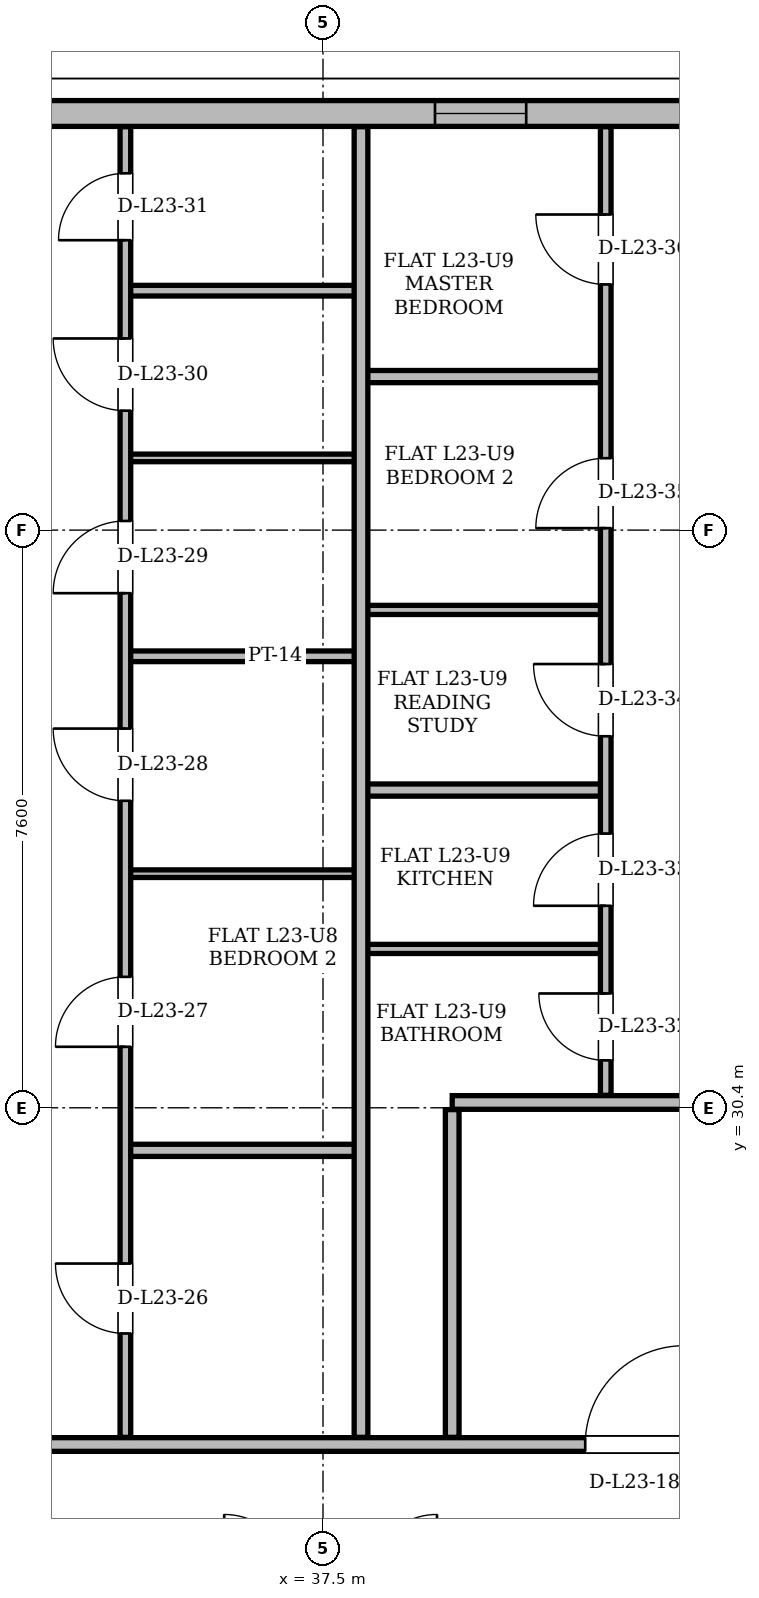
"""IFC4 building model, lengths in metres.
Left out: names, types, materials, properties, quantities, classifications, styles, units other than length and angle.
Written with IfcOpenShell. Run it as: python <this file> out.ifc"""

import sys

from ifc_helpers import new_model, si_unit, direction, frame, frame_2d, origin, place, context, subcontext, project, spatial, rectangle, extrude, element, fill, save


model = new_model("IFC4")
c1 = context("Model", 3, precision=1e-05, world=origin(), true_north=direction((0.0, 1.0)))
c2 = subcontext(c1, "Body", "Model", "MODEL_VIEW")
j1 = project(units=[si_unit("LENGTHUNIT", "METRE"), si_unit("PLANEANGLEUNIT", "RADIAN")], contexts=[c1])
p1 = place(None, origin())
s1 = spatial("IfcSite", under=j1, at=p1, CompositionType="ELEMENT")
p2 = place(p1, origin())
s2 = spatial("IfcBuilding", under=s1, at=p2, CompositionType="ELEMENT")
p3 = place(p2, frame((0.0, 0.0, 89.7)))
s3 = spatial("IfcBuildingStorey", under=s2, at=p3, CompositionType="ELEMENT", Elevation=89.7)
p4 = place(p3, frame((43.722, 43.481, 0.0), z_axis=(0.0, 0.0, 1.0), x_axis=(-1.0, 0.0, 0.0)))
e1 = element("IfcWall", 1, at=p4, inside=s3, PredefinedType="SOLIDWALL", context=c2, shape_type="SweptSolid", body=[
    extrude(rectangle(XDim=12.445, YDim=0.34, at=frame_2d((6.222, 0.0))), origin(), (0.0, 0.0, 1.0), 2.578),
])
p5 = place(p4, frame((3.549, 0.0, 0.85)))
e2 = element("IfcOpeningElement", 2, at=p5, cuts=e1, PredefinedType="OPENING", context=c2, shape_type="SweptSolid", body=[
    extrude(rectangle(XDim=1.2, YDim=1.48, at=frame_2d((0.6, 0.74))), frame((0.0, 0.17, 0.0), z_axis=(0.0, -1.0, 0.0), x_axis=(1.0, 0.0, 0.0)), (0.0, 0.0, 1.0), 0.34),
])
p6 = place(p3, frame((27.55, 25.97, 0.0), z_axis=(0.0, 0.0, 1.0), x_axis=(1.0, 0.0, 0.0)))
e3 = element("IfcWall", 3, at=p6, inside=s3, PredefinedType="PARTITIONING", context=c2, shape_type="SweptSolid", body=[
    extrude(rectangle(XDim=19.9, YDim=0.18, at=frame_2d((9.95, 0.0))), origin(), (0.0, 0.0, 1.0), 2.814),
])
p7 = place(p6, frame((0.425, 0.0, 0.0)))
e4 = element("IfcOpeningElement", 4, at=p7, cuts=e3, PredefinedType="OPENING", context=c2, shape_type="SweptSolid", body=[
    extrude(rectangle(XDim=1.0, YDim=2.18, at=frame_2d((0.5, 1.09))), frame((0.0, 0.09, 0.0), z_axis=(0.0, -1.0, 0.0), x_axis=(1.0, 0.0, 0.0)), (0.0, 0.0, 1.0), 0.18),
])
p8 = place(p6, frame((4.222, 0.0, 0.0)))
e5 = element("IfcOpeningElement", 5, at=p8, cuts=e3, PredefinedType="OPENING", context=c2, shape_type="SweptSolid", body=[
    extrude(rectangle(XDim=1.0, YDim=2.18, at=frame_2d((0.5, 1.09))), frame((0.0, 0.09, 0.0), z_axis=(0.0, -1.0, 0.0), x_axis=(1.0, 0.0, 0.0)), (0.0, 0.0, 1.0), 0.18),
])
p9 = place(p6, frame((13.4, 0.0, 0.0)))
e6 = element("IfcOpeningElement", 6, at=p9, cuts=e3, PredefinedType="OPENING", context=c2, shape_type="SweptSolid", body=[
    extrude(rectangle(XDim=1.3, YDim=2.2, at=frame_2d((0.65, 1.1))), frame((0.0, 0.09, 0.0), z_axis=(0.0, -1.0, 0.0), x_axis=(1.0, 0.0, 0.0)), (0.0, 0.0, 1.0), 0.18),
])
p10 = place(p6, frame((16.95, 0.0, 0.0)))
e7 = element("IfcOpeningElement", 7, at=p10, cuts=e3, PredefinedType="OPENING", context=c2, shape_type="SweptSolid", body=[
    extrude(rectangle(XDim=1.0, YDim=2.18, at=frame_2d((0.5, 1.09))), frame((0.0, 0.09, 0.0), z_axis=(0.0, -1.0, 0.0), x_axis=(1.0, 0.0, 0.0)), (0.0, 0.0, 1.0), 0.18),
])
p11 = place(p3, frame((34.9, 29.84, 0.0), z_axis=(0.0, 0.0, 1.0), x_axis=(1.0, 0.0, 0.0)))
e8 = element("IfcWall", 8, at=p11, inside=s3, PredefinedType="PARTITIONING", context=c2, shape_type="SweptSolid", body=[
    extrude(rectangle(XDim=3.15, YDim=0.16, at=frame_2d((1.575, 0.0))), origin(), (0.0, 0.0, 1.0), 3.36),
])
p12 = place(p3, frame((39.2, 30.47, 0.0), z_axis=(0.0, 0.0, 1.0), x_axis=(1.0, 0.0, 0.0)))
e9 = element("IfcWall", 9, at=p12, inside=s3, PredefinedType="PARTITIONING", context=c2, shape_type="SweptSolid", body=[
    extrude(rectangle(XDim=4.8, YDim=0.18, at=frame_2d((2.4, 0.0))), origin(), (0.0, 0.0, 1.0), 3.36),
])
p13 = place(p3, frame((37.95, 32.49, 0.0), z_axis=(0.0, 0.0, 1.0), x_axis=(1.0, 0.0, 0.0)))
e10 = element("IfcWall", 10, at=p13, inside=s3, PredefinedType="PARTITIONING", context=c2, shape_type="SweptSolid", body=[
    extrude(rectangle(XDim=3.27, YDim=0.12, at=frame_2d((1.635, 0.0))), origin(), (0.0, 0.0, 1.0), 3.36),
])
p14 = place(p3, frame((34.9, 33.48, 0.0), z_axis=(0.0, 0.0, 1.0), x_axis=(1.0, 0.0, 0.0)))
e11 = element("IfcWall", 11, at=p14, inside=s3, PredefinedType="PARTITIONING", context=c2, shape_type="SweptSolid", body=[
    extrude(rectangle(XDim=3.15, YDim=0.1, at=frame_2d((1.575, 0.0))), origin(), (0.0, 0.0, 1.0), 3.36),
])
p15 = place(p3, frame((37.95, 34.58, 0.0), z_axis=(0.0, 0.0, 1.0), x_axis=(1.0, 0.0, 0.0)))
e12 = element("IfcWall", 12, at=p15, inside=s3, PredefinedType="PARTITIONING", context=c2, shape_type="SweptSolid", body=[
    extrude(rectangle(XDim=3.27, YDim=0.16, at=frame_2d((1.635, 0.0))), origin(), (0.0, 0.0, 1.0), 3.36),
])
p16 = place(p3, frame((34.9, 36.34, 0.0), z_axis=(0.0, 0.0, 1.0), x_axis=(1.0, 0.0, 0.0)))
e13 = element("IfcWall", 13, at=p16, inside=s3, PredefinedType="PARTITIONING", context=c2, shape_type="SweptSolid", body=[
    extrude(rectangle(XDim=3.15, YDim=0.14, at=frame_2d((1.575, 0.0))), origin(), (0.0, 0.0, 1.0), 3.36),
])
p17 = place(p3, frame((37.95, 36.95, 0.0), z_axis=(0.0, 0.0, 1.0), x_axis=(1.0, 0.0, 0.0)))
e14 = element("IfcWall", 14, at=p17, inside=s3, PredefinedType="PARTITIONING", context=c2, shape_type="SweptSolid", body=[
    extrude(rectangle(XDim=3.27, YDim=0.12, at=frame_2d((1.635, 0.0))), origin(), (0.0, 0.0, 1.0), 3.36),
])
p18 = place(p3, frame((34.9, 38.95, 0.0), z_axis=(0.0, 0.0, 1.0), x_axis=(1.0, 0.0, 0.0)))
e15 = element("IfcWall", 15, at=p18, inside=s3, PredefinedType="PARTITIONING", context=c2, shape_type="SweptSolid", body=[
    extrude(rectangle(XDim=3.15, YDim=0.1, at=frame_2d((1.575, 0.0))), origin(), (0.0, 0.0, 1.0), 3.36),
])
p19 = place(p3, frame((37.95, 40.02, 0.0), z_axis=(0.0, 0.0, 1.0), x_axis=(1.0, 0.0, 0.0)))
e16 = element("IfcWall", 16, at=p19, inside=s3, PredefinedType="PARTITIONING", context=c2, shape_type="SweptSolid", body=[
    extrude(rectangle(XDim=3.27, YDim=0.16, at=frame_2d((1.635, 0.0))), origin(), (0.0, 0.0, 1.0), 3.36),
])
p20 = place(p3, frame((34.9, 41.15, 0.0), z_axis=(0.0, 0.0, 1.0), x_axis=(1.0, 0.0, 0.0)))
e17 = element("IfcWall", 17, at=p20, inside=s3, PredefinedType="PARTITIONING", context=c2, shape_type="SweptSolid", body=[
    extrude(rectangle(XDim=3.15, YDim=0.14, at=frame_2d((1.575, 0.0))), origin(), (0.0, 0.0, 1.0), 3.36),
])
p21 = place(p3, frame((34.9, 26.064, 0.0), z_axis=(0.0, 0.0, 1.0), x_axis=(0.0, 1.0, 0.0)))
e18 = element("IfcWall", 18, at=p21, inside=s3, PredefinedType="PARTITIONING", context=c2, shape_type="SweptSolid", body=[
    extrude(rectangle(XDim=17.243, YDim=0.14, at=frame_2d((8.622, 0.0))), origin(), (0.0, 0.0, 1.0), 3.36),
])
p22 = place(p21, frame((1.367, 0.0, 0.0)))
e19 = element("IfcOpeningElement", 19, at=p22, cuts=e18, PredefinedType="OPENING", context=c2, shape_type="SweptSolid", body=[
    extrude(rectangle(XDim=0.92, YDim=2.12, at=frame_2d((0.46, 1.06))), frame((0.0, 0.07, 0.0), z_axis=(0.0, -1.0, 0.0), x_axis=(1.0, 0.0, 0.0)), (0.0, 0.0, 1.0), 0.14),
])
p23 = place(p21, frame((5.138, 0.0, 0.0)))
e20 = element("IfcOpeningElement", 20, at=p23, cuts=e18, PredefinedType="OPENING", context=c2, shape_type="SweptSolid", body=[
    extrude(rectangle(XDim=0.92, YDim=2.12, at=frame_2d((0.46, 1.06))), frame((0.0, 0.07, 0.0), z_axis=(0.0, -1.0, 0.0), x_axis=(1.0, 0.0, 0.0)), (0.0, 0.0, 1.0), 0.14),
])
p24 = place(p21, frame((8.375, 0.0, 0.0)))
e21 = element("IfcOpeningElement", 21, at=p24, cuts=e18, PredefinedType="OPENING", context=c2, shape_type="SweptSolid", body=[
    extrude(rectangle(XDim=0.95, YDim=2.1, at=frame_2d((0.475, 1.05))), frame((0.0, 0.07, 0.0), z_axis=(0.0, -1.0, 0.0), x_axis=(1.0, 0.0, 0.0)), (0.0, 0.0, 1.0), 0.14),
])
p25 = place(p21, frame((11.106, 0.0, 0.0)))
e22 = element("IfcOpeningElement", 22, at=p25, cuts=e18, PredefinedType="OPENING", context=c2, shape_type="SweptSolid", body=[
    extrude(rectangle(XDim=0.95, YDim=2.1, at=frame_2d((0.475, 1.05))), frame((0.0, 0.07, 0.0), z_axis=(0.0, -1.0, 0.0), x_axis=(1.0, 0.0, 0.0)), (0.0, 0.0, 1.0), 0.14),
])
p26 = place(p21, frame((13.507, 0.0, 0.0)))
e23 = element("IfcOpeningElement", 23, at=p26, cuts=e18, PredefinedType="OPENING", context=c2, shape_type="SweptSolid", body=[
    extrude(rectangle(XDim=0.95, YDim=2.1, at=frame_2d((0.475, 1.05))), frame((0.0, 0.07, 0.0), z_axis=(0.0, -1.0, 0.0), x_axis=(1.0, 0.0, 0.0)), (0.0, 0.0, 1.0), 0.14),
])
p27 = place(p21, frame((15.75, 0.0, 0.0)))
e24 = element("IfcOpeningElement", 24, at=p27, cuts=e18, PredefinedType="OPENING", context=c2, shape_type="SweptSolid", body=[
    extrude(rectangle(XDim=0.88, YDim=2.08, at=frame_2d((0.44, 1.04))), frame((0.0, 0.07, 0.0), z_axis=(0.0, -1.0, 0.0), x_axis=(1.0, 0.0, 0.0)), (0.0, 0.0, 1.0), 0.14),
])
p28 = place(p3, frame((38.0, 26.064, 0.0), z_axis=(0.0, 0.0, 1.0), x_axis=(0.0, 1.0, 0.0)))
e25 = element("IfcWall", 25, at=p28, inside=s3, PredefinedType="PARTITIONING", context=c2, shape_type="SweptSolid", body=[
    extrude(rectangle(XDim=17.243, YDim=0.18, at=frame_2d((8.622, 0.0))), origin(), (0.0, 0.0, 1.0), 3.36),
])
p29 = place(p3, frame((39.2, 26.064, 0.0), z_axis=(0.0, 0.0, 1.0), x_axis=(0.0, 1.0, 0.0)))
e26 = element("IfcWall", 26, at=p29, inside=s3, PredefinedType="PARTITIONING", context=c2, shape_type="SweptSolid", body=[
    extrude(rectangle(XDim=4.312, YDim=0.18, at=frame_2d((2.156, 0.0))), origin(), (0.0, 0.0, 1.0), 3.36),
])
p30 = place(p3, frame((41.22, 30.564, 0.0), z_axis=(0.0, 0.0, 1.0), x_axis=(0.0, 1.0, 0.0)))
e27 = element("IfcWall", 27, at=p30, inside=s3, PredefinedType="PARTITIONING", context=c2, shape_type="SweptSolid", body=[
    extrude(rectangle(XDim=12.743, YDim=0.14, at=frame_2d((6.372, 0.0))), origin(), (0.0, 0.0, 1.0), 3.36),
])
p31 = place(p30, frame((0.46, 0.0, 0.0)))
e28 = element("IfcOpeningElement", 28, at=p31, cuts=e27, PredefinedType="OPENING", context=c2, shape_type="SweptSolid", body=[
    extrude(rectangle(XDim=0.88, YDim=2.08, at=frame_2d((0.44, 1.04))), frame((0.0, 0.07, 0.0), z_axis=(0.0, -1.0, 0.0), x_axis=(1.0, 0.0, 0.0)), (0.0, 0.0, 1.0), 0.14),
])
p32 = place(p30, frame((2.494, 0.0, 0.0)))
e29 = element("IfcOpeningElement", 29, at=p32, cuts=e27, PredefinedType="OPENING", context=c2, shape_type="SweptSolid", body=[
    extrude(rectangle(XDim=0.95, YDim=2.1, at=frame_2d((0.475, 1.05))), frame((0.0, 0.07, 0.0), z_axis=(0.0, -1.0, 0.0), x_axis=(1.0, 0.0, 0.0)), (0.0, 0.0, 1.0), 0.14),
])
p33 = place(p30, frame((4.724, 0.0, 0.0)))
e30 = element("IfcOpeningElement", 30, at=p33, cuts=e27, PredefinedType="OPENING", context=c2, shape_type="SweptSolid", body=[
    extrude(rectangle(XDim=0.95, YDim=2.1, at=frame_2d((0.475, 1.05))), frame((0.0, 0.07, 0.0), z_axis=(0.0, -1.0, 0.0), x_axis=(1.0, 0.0, 0.0)), (0.0, 0.0, 1.0), 0.14),
])
p34 = place(p30, frame((7.462, 0.0, 0.0)))
e31 = element("IfcOpeningElement", 31, at=p34, cuts=e27, PredefinedType="OPENING", context=c2, shape_type="SweptSolid", body=[
    extrude(rectangle(XDim=0.92, YDim=2.12, at=frame_2d((0.46, 1.06))), frame((0.0, 0.07, 0.0), z_axis=(0.0, -1.0, 0.0), x_axis=(1.0, 0.0, 0.0)), (0.0, 0.0, 1.0), 0.14),
])
p35 = place(p30, frame((10.668, 0.0, 0.0)))
e32 = element("IfcOpeningElement", 32, at=p35, cuts=e27, PredefinedType="OPENING", context=c2, shape_type="SweptSolid", body=[
    extrude(rectangle(XDim=0.92, YDim=2.12, at=frame_2d((0.46, 1.06))), frame((0.0, 0.07, 0.0), z_axis=(0.0, -1.0, 0.0), x_axis=(1.0, 0.0, 0.0)), (0.0, 0.0, 1.0), 0.14),
])
p36 = place(p5, origin())
e33 = element("IfcWindow", 33, at=p36, inside=s3, PartitioningType="SINGLE_PANEL", PredefinedType="WINDOW", context=c2, shape_type="SweptSolid", body=[
    extrude(rectangle(XDim=1.2, YDim=1.48, at=frame_2d((0.6, 0.74))), frame((0.0, 0.03, 0.0), z_axis=(0.0, -1.0, 0.0), x_axis=(1.0, 0.0, 0.0)), (0.0, 0.0, 1.0), 0.06),
])
fill(e2, e33)
p37 = place(p9, origin())
e34 = element("IfcDoor", 34, at=p37, inside=s3, OperationType="SINGLE_SWING_RIGHT", PredefinedType="DOOR", context=c2, shape_type="SweptSolid", body=[
    extrude(rectangle(XDim=1.3, YDim=2.2, at=frame_2d((0.65, 1.1))), frame((0.0, 0.025, 0.0), z_axis=(0.0, -1.0, 0.0), x_axis=(1.0, 0.0, 0.0)), (0.0, 0.0, 1.0), 0.05),
])
fill(e6, e34)
p38 = place(p22, origin())
e35 = element("IfcDoor", 35, at=p38, inside=s3, OperationType="SINGLE_SWING_RIGHT", PredefinedType="DOOR", context=c2, shape_type="SweptSolid", body=[
    extrude(rectangle(XDim=0.92, YDim=2.12, at=frame_2d((0.46, 1.06))), frame((0.0, 0.025, 0.0), z_axis=(0.0, -1.0, 0.0), x_axis=(1.0, 0.0, 0.0)), (0.0, 0.0, 1.0), 0.05),
])
fill(e19, e35)
p39 = place(p23, origin())
e36 = element("IfcDoor", 36, at=p39, inside=s3, OperationType="SINGLE_SWING_LEFT", PredefinedType="DOOR", context=c2, shape_type="SweptSolid", body=[
    extrude(rectangle(XDim=0.92, YDim=2.12, at=frame_2d((0.46, 1.06))), frame((0.0, 0.025, 0.0), z_axis=(0.0, -1.0, 0.0), x_axis=(1.0, 0.0, 0.0)), (0.0, 0.0, 1.0), 0.05),
])
fill(e20, e36)
p40 = place(p24, origin())
e37 = element("IfcDoor", 37, at=p40, inside=s3, OperationType="SINGLE_SWING_RIGHT", PredefinedType="DOOR", context=c2, shape_type="SweptSolid", body=[
    extrude(rectangle(XDim=0.95, YDim=2.1, at=frame_2d((0.475, 1.05))), frame((0.0, 0.025, 0.0), z_axis=(0.0, -1.0, 0.0), x_axis=(1.0, 0.0, 0.0)), (0.0, 0.0, 1.0), 0.05),
])
fill(e21, e37)
p41 = place(p25, origin())
e38 = element("IfcDoor", 38, at=p41, inside=s3, OperationType="SINGLE_SWING_LEFT", PredefinedType="DOOR", context=c2, shape_type="SweptSolid", body=[
    extrude(rectangle(XDim=0.95, YDim=2.1, at=frame_2d((0.475, 1.05))), frame((0.0, 0.025, 0.0), z_axis=(0.0, -1.0, 0.0), x_axis=(1.0, 0.0, 0.0)), (0.0, 0.0, 1.0), 0.05),
])
fill(e22, e38)
p42 = place(p26, origin())
e39 = element("IfcDoor", 39, at=p42, inside=s3, OperationType="SINGLE_SWING_RIGHT", PredefinedType="DOOR", context=c2, shape_type="SweptSolid", body=[
    extrude(rectangle(XDim=0.95, YDim=2.1, at=frame_2d((0.475, 1.05))), frame((0.0, 0.025, 0.0), z_axis=(0.0, -1.0, 0.0), x_axis=(1.0, 0.0, 0.0)), (0.0, 0.0, 1.0), 0.05),
])
fill(e23, e39)
p43 = place(p27, origin())
e40 = element("IfcDoor", 40, at=p43, inside=s3, OperationType="SINGLE_SWING_LEFT", PredefinedType="DOOR", context=c2, shape_type="SweptSolid", body=[
    extrude(rectangle(XDim=0.88, YDim=2.08, at=frame_2d((0.44, 1.04))), frame((0.0, 0.025, 0.0), z_axis=(0.0, -1.0, 0.0), x_axis=(1.0, 0.0, 0.0)), (0.0, 0.0, 1.0), 0.05),
])
fill(e24, e40)
p44 = place(p31, origin())
e41 = element("IfcDoor", 41, at=p44, inside=s3, OperationType="SINGLE_SWING_RIGHT", PredefinedType="DOOR", context=c2, shape_type="SweptSolid", body=[
    extrude(rectangle(XDim=0.88, YDim=2.08, at=frame_2d((0.44, 1.04))), frame((0.0, 0.025, 0.0), z_axis=(0.0, -1.0, 0.0), x_axis=(1.0, 0.0, 0.0)), (0.0, 0.0, 1.0), 0.05),
])
fill(e28, e41)
p45 = place(p32, origin())
e42 = element("IfcDoor", 42, at=p45, inside=s3, OperationType="SINGLE_SWING_LEFT", PredefinedType="DOOR", context=c2, shape_type="SweptSolid", body=[
    extrude(rectangle(XDim=0.95, YDim=2.1, at=frame_2d((0.475, 1.05))), frame((0.0, 0.025, 0.0), z_axis=(0.0, -1.0, 0.0), x_axis=(1.0, 0.0, 0.0)), (0.0, 0.0, 1.0), 0.05),
])
fill(e29, e42)
p46 = place(p33, origin())
e43 = element("IfcDoor", 43, at=p46, inside=s3, OperationType="SINGLE_SWING_RIGHT", PredefinedType="DOOR", context=c2, shape_type="SweptSolid", body=[
    extrude(rectangle(XDim=0.95, YDim=2.1, at=frame_2d((0.475, 1.05))), frame((0.0, 0.025, 0.0), z_axis=(0.0, -1.0, 0.0), x_axis=(1.0, 0.0, 0.0)), (0.0, 0.0, 1.0), 0.05),
])
fill(e30, e43)
p47 = place(p34, origin())
e44 = element("IfcDoor", 44, at=p47, inside=s3, OperationType="SINGLE_SWING_LEFT", PredefinedType="DOOR", context=c2, shape_type="SweptSolid", body=[
    extrude(rectangle(XDim=0.92, YDim=2.12, at=frame_2d((0.46, 1.06))), frame((0.0, 0.025, 0.0), z_axis=(0.0, -1.0, 0.0), x_axis=(1.0, 0.0, 0.0)), (0.0, 0.0, 1.0), 0.05),
])
fill(e31, e44)
p48 = place(p35, origin())
e45 = element("IfcDoor", 45, at=p48, inside=s3, OperationType="SINGLE_SWING_RIGHT", PredefinedType="DOOR", context=c2, shape_type="SweptSolid", body=[
    extrude(rectangle(XDim=0.92, YDim=2.12, at=frame_2d((0.46, 1.06))), frame((0.0, 0.025, 0.0), z_axis=(0.0, -1.0, 0.0), x_axis=(1.0, 0.0, 0.0)), (0.0, 0.0, 1.0), 0.05),
])
fill(e32, e45)
save(model, sys.argv[1])
